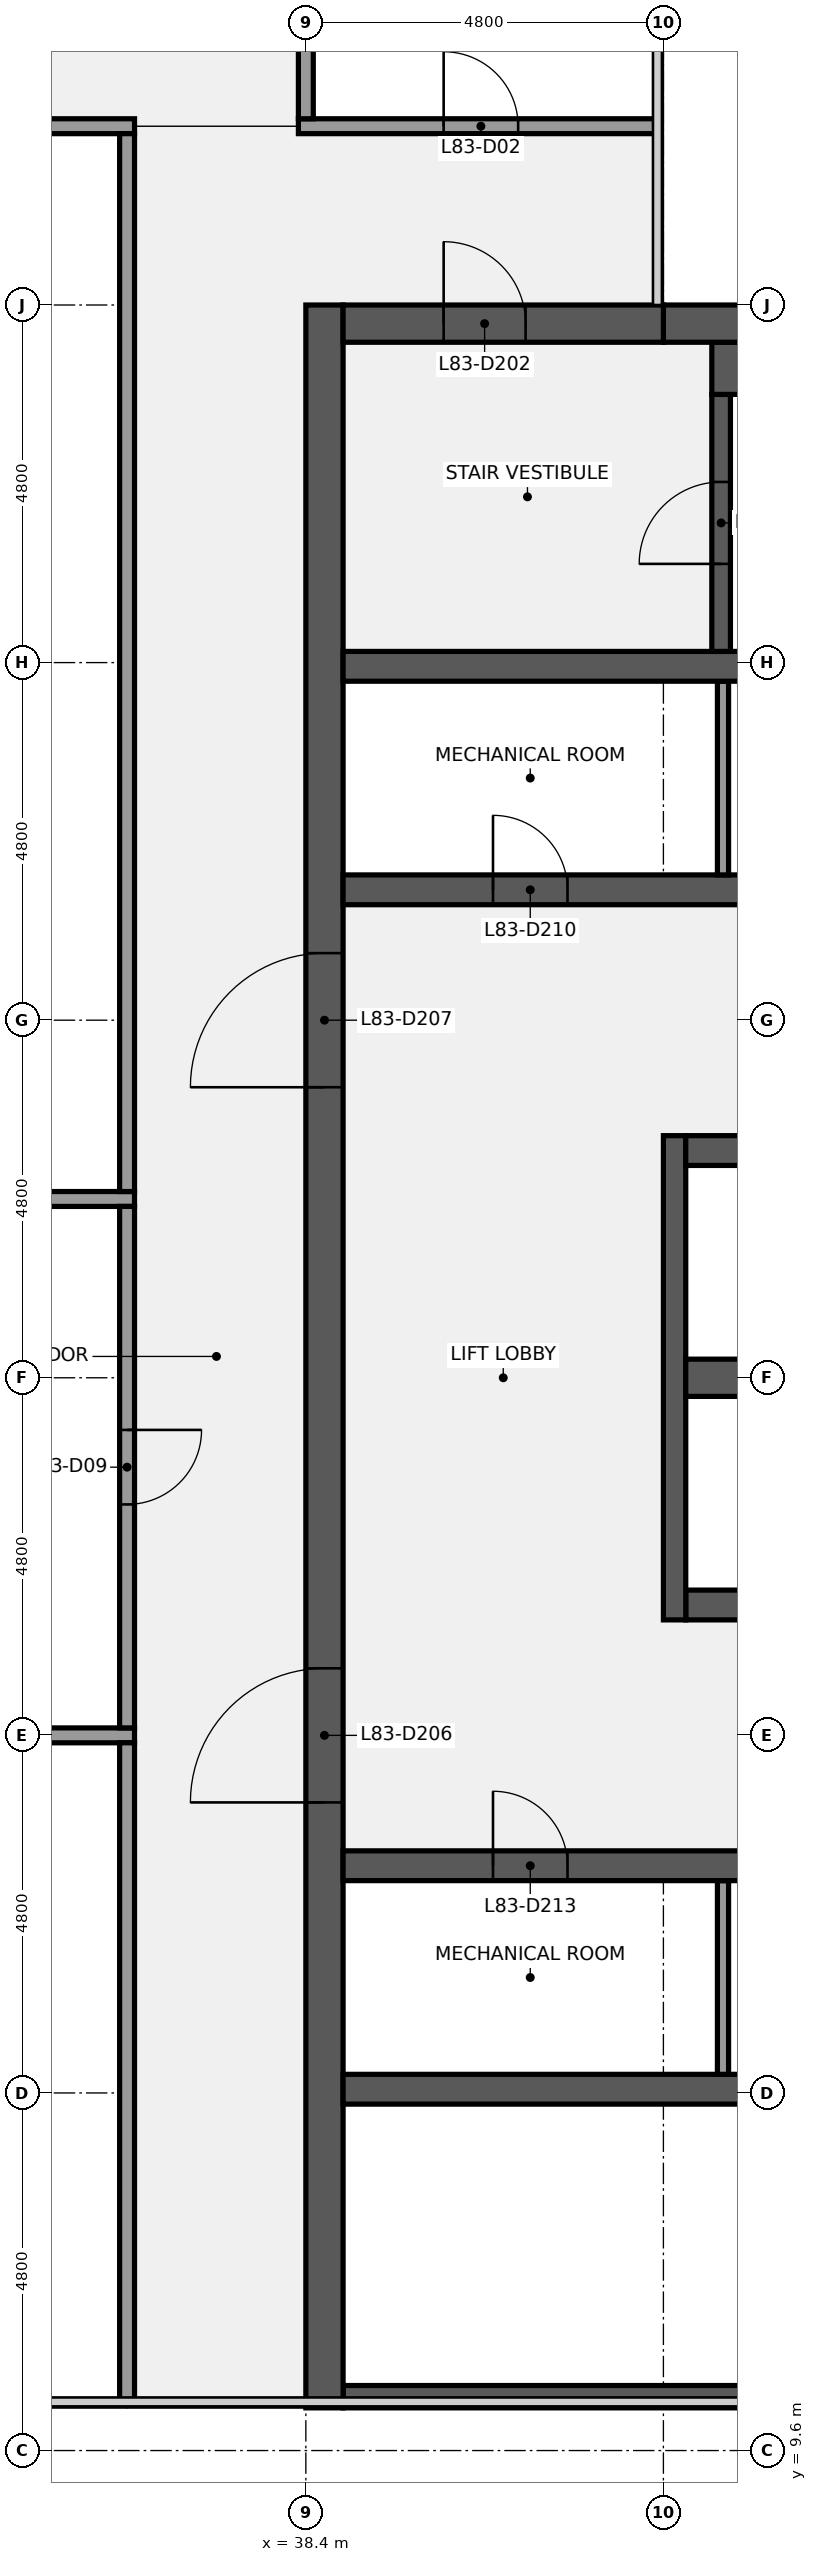
"""IFC4 building model, lengths in metres.
Left out: names, types, materials, properties, quantities, classifications, styles, units other than length and angle.
Written with IfcOpenShell. Run it as: python <this file> out.ifc"""

import sys

from ifc_helpers import new_model, si_unit, direction, frame, frame_2d, origin, place, context, subcontext, project, spatial, polyline, rectangle, outline, extrude, element, fill, save


model = new_model("IFC4")
c1 = context("Model", 3, precision=1e-05, world=origin(), true_north=direction((0.0, 1.0)))
c2 = subcontext(c1, "Body", "Model", "MODEL_VIEW")
j1 = project(units=[si_unit("LENGTHUNIT", "METRE"), si_unit("PLANEANGLEUNIT", "RADIAN")], contexts=[c1])
p1 = place(None, origin())
s1 = spatial("IfcSite", under=j1, at=p1, CompositionType="ELEMENT")
p2 = place(p1, origin())
s2 = spatial("IfcBuilding", under=s1, at=p2, CompositionType="ELEMENT")
p3 = place(p2, frame((0.0, 0.0, 370.3)))
s3 = spatial("IfcBuildingStorey", under=s2, at=p3, CompositionType="ELEMENT", Elevation=370.3)
p4 = place(p3, frame((57.1, 10.323, 0.0), z_axis=(0.0, 0.0, 1.0), x_axis=(-1.0, 0.0, 0.0)))
e1 = element("IfcWall", 1, at=p4, inside=s3, PredefinedType="SHEAR", context=c2, shape_type="SweptSolid", body=[
    extrude(outline(polyline([(0.0, 0.0), (18.2, 0.0), (18.2, 2.639), (0.0, 2.639), (0.0, 0.0)])), frame((0.0, 0.15, 0.0), z_axis=(0.0, -1.0, 0.0), x_axis=(1.0, 0.0, 0.0)), (0.0, 0.0, 1.0), 0.3),
])
p5 = place(p3, frame((38.65, 10.173, 0.0), z_axis=(0.0, 0.0, 1.0), x_axis=(0.0, 1.0, 0.0)))
e2 = element("IfcWall", 2, at=p5, inside=s3, PredefinedType="SHEAR", context=c2, shape_type="SweptSolid", body=[
    extrude(outline(polyline([(0.0, 0.0), (28.227, 0.0), (28.227, 3.75), (1.247, 3.75), (0.0, 2.488), (0.0, 0.0)])), frame((0.0, 0.25, 0.0), z_axis=(0.0, -1.0, 0.0), x_axis=(1.0, 0.0, 0.0)), (0.0, 0.0, 1.0), 0.5),
])
p6 = place(p5, frame((8.127, 0.0, 0.0)))
e3 = element("IfcOpeningElement", 3, at=p6, cuts=e2, PredefinedType="OPENING", context=c2, shape_type="SweptSolid", body=[
    extrude(rectangle(XDim=1.8, YDim=2.1, at=frame_2d((0.9, 1.05))), frame((0.0, 0.26, 0.0), z_axis=(0.0, -1.0, 0.0), x_axis=(1.0, 0.0, 0.0)), (0.0, 0.0, 1.0), 0.52),
])
p7 = place(p5, frame((17.727, 0.0, 0.0)))
e4 = element("IfcOpeningElement", 4, at=p7, cuts=e2, PredefinedType="OPENING", context=c2, shape_type="SweptSolid", body=[
    extrude(rectangle(XDim=1.8, YDim=2.1, at=frame_2d((0.9, 1.05))), frame((0.0, 0.26, 0.0), z_axis=(0.0, -1.0, 0.0), x_axis=(1.0, 0.0, 0.0)), (0.0, 0.0, 1.0), 0.52),
])
p8 = place(p3, frame((38.9, 14.45, 0.0), z_axis=(0.0, 0.0, 1.0), x_axis=(1.0, 0.0, 0.0)))
e5 = element("IfcWall", 5, at=p8, inside=s3, PredefinedType="SHEAR", context=c2, shape_type="SweptSolid", body=[
    extrude(rectangle(XDim=18.2, YDim=0.4, at=frame_2d((9.1, 0.0))), origin(), (0.0, 0.0, 1.0), 3.75),
])
p9 = place(p8, frame((12.7, 0.0, 0.0)))
e6 = element("IfcOpeningElement", 6, at=p9, cuts=e5, PredefinedType="OPENING", context=c2, shape_type="SweptSolid", body=[
    extrude(rectangle(XDim=1.0, YDim=2.1, at=frame_2d((0.5, 1.05))), frame((0.0, 0.21, 0.0), z_axis=(0.0, -1.0, 0.0), x_axis=(1.0, 0.0, 0.0)), (0.0, 0.0, 1.0), 0.42),
])
p10 = place(p3, frame((44.0, 14.65, 0.0), z_axis=(0.0, 0.0, 1.0), x_axis=(0.0, 1.0, 0.0)))
e7 = element("IfcWall", 7, at=p10, inside=s3, PredefinedType="PARTITIONING", context=c2, shape_type="SweptSolid", body=[
    extrude(rectangle(XDim=2.6, YDim=0.15, at=frame_2d((1.3, 0.0))), origin(), (0.0, 0.0, 1.0), 3.75),
])
p11 = place(p3, frame((38.9, 17.45, 0.0), z_axis=(0.0, 0.0, 1.0), x_axis=(1.0, 0.0, 0.0)))
e8 = element("IfcWall", 8, at=p11, inside=s3, PredefinedType="SHEAR", context=c2, shape_type="SweptSolid", body=[
    extrude(rectangle(XDim=18.2, YDim=0.4, at=frame_2d((9.1, 0.0))), origin(), (0.0, 0.0, 1.0), 3.75),
])
p12 = place(p11, frame((13.587, 0.0, 0.0)))
e9 = element("IfcOpeningElement", 9, at=p12, cuts=e8, PredefinedType="OPENING", context=c2, shape_type="SweptSolid", body=[
    extrude(rectangle(XDim=1.0, YDim=2.1, at=frame_2d((0.5, 1.05))), frame((0.0, 0.21, 0.0), z_axis=(0.0, -1.0, 0.0), x_axis=(1.0, 0.0, 0.0)), (0.0, 0.0, 1.0), 0.42),
])
p13 = place(p11, frame((7.0, 0.0, 0.0)))
e10 = element("IfcOpeningElement", 10, at=p13, cuts=e8, PredefinedType="OPENING", context=c2, shape_type="SweptSolid", body=[
    extrude(rectangle(XDim=1.0, YDim=2.1, at=frame_2d((0.5, 1.05))), frame((0.0, 0.21, 0.0), z_axis=(0.0, -1.0, 0.0), x_axis=(1.0, 0.0, 0.0)), (0.0, 0.0, 1.0), 0.42),
])
p14 = place(p11, frame((2.012, 0.0, 0.0)))
e11 = element("IfcOpeningElement", 11, at=p14, cuts=e8, PredefinedType="OPENING", context=c2, shape_type="SweptSolid", body=[
    extrude(rectangle(XDim=1.0, YDim=2.1, at=frame_2d((0.5, 1.05))), frame((0.0, 0.21, 0.0), z_axis=(0.0, -1.0, 0.0), x_axis=(1.0, 0.0, 0.0)), (0.0, 0.0, 1.0), 0.42),
])
p15 = place(p3, frame((43.5, 20.95, 0.0), z_axis=(0.0, 0.0, 1.0), x_axis=(1.0, 0.0, 0.0)))
e12 = element("IfcWall", 12, at=p15, inside=s3, PredefinedType="SHEAR", context=c2, shape_type="SweptSolid", body=[
    extrude(rectangle(XDim=13.6, YDim=0.4, at=frame_2d((6.8, 0.0))), origin(), (0.0, 0.0, 1.0), 3.75),
])
p16 = place(p15, frame((6.15, 0.0, 0.0)))
e13 = element("IfcOpeningElement", 13, at=p16, cuts=e12, PredefinedType="OPENING", context=c2, shape_type="SweptSolid", body=[
    extrude(rectangle(XDim=1.1, YDim=2.1, at=frame_2d((0.55, 1.05))), frame((0.0, 0.21, 0.0), z_axis=(0.0, -1.0, 0.0), x_axis=(1.0, 0.0, 0.0)), (0.0, 0.0, 1.0), 0.42),
])
p17 = place(p15, frame((1.3, 0.0, 0.0)))
e14 = element("IfcOpeningElement", 14, at=p17, cuts=e12, PredefinedType="OPENING", context=c2, shape_type="SweptSolid", body=[
    extrude(rectangle(XDim=1.0, YDim=2.1, at=frame_2d((0.5, 1.05))), frame((0.0, 0.21, 0.0), z_axis=(0.0, -1.0, 0.0), x_axis=(1.0, 0.0, 0.0)), (0.0, 0.0, 1.0), 0.42),
])
p18 = place(p3, frame((43.35, 20.75, 0.0), z_axis=(0.0, 0.0, 1.0), x_axis=(0.0, 1.0, 0.0)))
e15 = element("IfcWall", 15, at=p18, inside=s3, PredefinedType="SHEAR", context=c2, shape_type="SweptSolid", body=[
    extrude(rectangle(XDim=6.5, YDim=0.3, at=frame_2d((3.25, 0.0))), origin(), (0.0, 0.0, 1.0), 3.75),
])
p19 = place(p3, frame((43.5, 24.0, 0.0), z_axis=(0.0, 0.0, 1.0), x_axis=(1.0, 0.0, 0.0)))
e16 = element("IfcWall", 16, at=p19, inside=s3, PredefinedType="SHEAR", context=c2, shape_type="SweptSolid", body=[
    extrude(rectangle(XDim=13.6, YDim=0.5, at=frame_2d((6.8, 0.0))), origin(), (0.0, 0.0, 1.0), 3.75),
])
p20 = place(p3, frame((43.5, 27.05, 0.0), z_axis=(0.0, 0.0, 1.0), x_axis=(1.0, 0.0, 0.0)))
e17 = element("IfcWall", 17, at=p20, inside=s3, PredefinedType="SHEAR", context=c2, shape_type="SweptSolid", body=[
    extrude(rectangle(XDim=13.6, YDim=0.4, at=frame_2d((6.8, 0.0))), origin(), (0.0, 0.0, 1.0), 3.75),
])
p21 = place(p20, frame((8.7, 0.0, 0.0)))
e18 = element("IfcOpeningElement", 18, at=p21, cuts=e17, PredefinedType="OPENING", context=c2, shape_type="SweptSolid", body=[
    extrude(rectangle(XDim=1.0, YDim=2.1, at=frame_2d((0.5, 1.05))), frame((0.0, 0.21, 0.0), z_axis=(0.0, -1.0, 0.0), x_axis=(1.0, 0.0, 0.0)), (0.0, 0.0, 1.0), 0.42),
])
p22 = place(p20, frame((1.5, 0.0, 0.0)))
e19 = element("IfcOpeningElement", 19, at=p22, cuts=e17, PredefinedType="OPENING", context=c2, shape_type="SweptSolid", body=[
    extrude(rectangle(XDim=1.2, YDim=2.1, at=frame_2d((0.6, 1.05))), frame((0.0, 0.21, 0.0), z_axis=(0.0, -1.0, 0.0), x_axis=(1.0, 0.0, 0.0)), (0.0, 0.0, 1.0), 0.42),
])
p23 = place(p3, frame((38.9, 30.55, 0.0), z_axis=(0.0, 0.0, 1.0), x_axis=(1.0, 0.0, 0.0)))
e20 = element("IfcWall", 20, at=p23, inside=s3, PredefinedType="SHEAR", context=c2, shape_type="SweptSolid", body=[
    extrude(rectangle(XDim=18.2, YDim=0.4, at=frame_2d((9.1, 0.0))), origin(), (0.0, 0.0, 1.0), 3.75),
])
p24 = place(p23, frame((13.587, 0.0, 0.0)))
e21 = element("IfcOpeningElement", 21, at=p24, cuts=e20, PredefinedType="OPENING", context=c2, shape_type="SweptSolid", body=[
    extrude(rectangle(XDim=1.0, YDim=2.1, at=frame_2d((0.5, 1.05))), frame((0.0, 0.21, 0.0), z_axis=(0.0, -1.0, 0.0), x_axis=(1.0, 0.0, 0.0)), (0.0, 0.0, 1.0), 0.42),
])
p25 = place(p23, frame((7.0, 0.0, 0.0)))
e22 = element("IfcOpeningElement", 22, at=p25, cuts=e20, PredefinedType="OPENING", context=c2, shape_type="SweptSolid", body=[
    extrude(rectangle(XDim=1.0, YDim=2.1, at=frame_2d((0.5, 1.05))), frame((0.0, 0.21, 0.0), z_axis=(0.0, -1.0, 0.0), x_axis=(1.0, 0.0, 0.0)), (0.0, 0.0, 1.0), 0.42),
])
p26 = place(p23, frame((2.012, 0.0, 0.0)))
e23 = element("IfcOpeningElement", 23, at=p26, cuts=e20, PredefinedType="OPENING", context=c2, shape_type="SweptSolid", body=[
    extrude(rectangle(XDim=1.0, YDim=2.1, at=frame_2d((0.5, 1.05))), frame((0.0, 0.21, 0.0), z_axis=(0.0, -1.0, 0.0), x_axis=(1.0, 0.0, 0.0)), (0.0, 0.0, 1.0), 0.42),
])
p27 = place(p3, frame((44.0, 30.75, 0.0), z_axis=(0.0, 0.0, 1.0), x_axis=(0.0, 1.0, 0.0)))
e24 = element("IfcWall", 24, at=p27, inside=s3, PredefinedType="PARTITIONING", context=c2, shape_type="SweptSolid", body=[
    extrude(rectangle(XDim=2.6, YDim=0.15, at=frame_2d((1.3, 0.0))), origin(), (0.0, 0.0, 1.0), 3.75),
])
p28 = place(p3, frame((38.9, 33.55, 0.0), z_axis=(0.0, 0.0, 1.0), x_axis=(1.0, 0.0, 0.0)))
e25 = element("IfcWall", 25, at=p28, inside=s3, PredefinedType="SHEAR", context=c2, shape_type="SweptSolid", body=[
    extrude(rectangle(XDim=18.2, YDim=0.4, at=frame_2d((9.1, 0.0))), origin(), (0.0, 0.0, 1.0), 3.75),
])
p29 = place(p3, frame((43.975, 33.75, 0.0), z_axis=(0.0, 0.0, 1.0), x_axis=(0.0, 1.0, 0.0)))
e26 = element("IfcWall", 26, at=p29, inside=s3, PredefinedType="SHEAR", context=c2, shape_type="SweptSolid", body=[
    extrude(rectangle(XDim=3.45, YDim=0.25, at=frame_2d((1.725, 0.0))), origin(), (0.0, 0.0, 1.0), 3.75),
])
p30 = place(p29, frame((1.175, 0.0, 0.0)))
e27 = element("IfcOpeningElement", 27, at=p30, cuts=e26, PredefinedType="OPENING", context=c2, shape_type="SweptSolid", body=[
    extrude(rectangle(XDim=1.1, YDim=2.1, at=frame_2d((0.55, 1.05))), frame((0.0, 0.135, 0.0), z_axis=(0.0, -1.0, 0.0), x_axis=(1.0, 0.0, 0.0)), (0.0, 0.0, 1.0), 0.27),
])
p31 = place(p3, frame((43.85, 37.55, 0.0), z_axis=(0.0, 0.0, 1.0), x_axis=(1.0, 0.0, 0.0)))
e28 = element("IfcWall", 28, at=p31, inside=s3, PredefinedType="SHEAR", context=c2, shape_type="SweptSolid", body=[
    extrude(rectangle(XDim=7.5, YDim=0.7, at=frame_2d((3.75, 0.0))), origin(), (0.0, 0.0, 1.0), 3.75),
])
p32 = place(p3, frame((43.2, 38.15, 0.0), z_axis=(0.0, 0.0, 1.0), x_axis=(1.0, 0.0, 0.0)))
e29 = element("IfcWall", 29, at=p32, inside=s3, PredefinedType="SHEAR", context=c2, shape_type="SweptSolid", body=[
    extrude(rectangle(XDim=13.9, YDim=0.5, at=frame_2d((6.95, 0.0))), origin(), (0.0, 0.0, 1.0), 3.75),
])
p33 = place(p3, frame((38.9, 38.15, 0.0), z_axis=(0.0, 0.0, 1.0), x_axis=(1.0, 0.0, 0.0)))
e30 = element("IfcWall", 30, at=p33, inside=s3, PredefinedType="SHEAR", context=c2, shape_type="SweptSolid", body=[
    extrude(rectangle(XDim=4.3, YDim=0.5, at=frame_2d((2.15, 0.0))), origin(), (0.0, 0.0, 1.0), 3.75),
])
p34 = place(p33, frame((1.35, 0.0, 0.0)))
e31 = element("IfcOpeningElement", 31, at=p34, cuts=e30, PredefinedType="OPENING", context=c2, shape_type="SweptSolid", body=[
    extrude(rectangle(XDim=1.1, YDim=2.1, at=frame_2d((0.55, 1.05))), frame((0.0, 0.26, 0.0), z_axis=(0.0, -1.0, 0.0), x_axis=(1.0, 0.0, 0.0)), (0.0, 0.0, 1.0), 0.52),
])
for number, where, z_axis, x_axis in (
    (32, (21.5, 19.2, 0.0), (0.0, 0.0, 1.0), (1.0, 0.0, 0.0)),
    (33, (21.5, 26.4, 0.0), (0.0, 0.0, 1.0), (1.0, 0.0, 0.0)),
    (34, (21.5, 40.8, 0.0), (0.0, 0.0, 1.0), (1.0, 0.0, 0.0)),
):
    element("IfcWall", number, at=place(p3, frame(where, z_axis=z_axis, x_axis=x_axis)), inside=s3, PredefinedType="PARTITIONING", context=c2, shape_type="SweptSolid", body=[
        extrude(rectangle(XDim=14.6, YDim=0.2, at=frame_2d((7.3, 0.0))), origin(), (0.0, 0.0, 1.0), 2.759),
    ])
p35 = place(p3, frame((38.3, 40.8, 0.0), z_axis=(0.0, 0.0, 1.0), x_axis=(1.0, 0.0, 0.0)))
e35 = element("IfcWall", 35, at=p35, inside=s3, PredefinedType="PARTITIONING", context=c2, shape_type="SweptSolid", body=[
    extrude(rectangle(XDim=4.8, YDim=0.2, at=frame_2d((2.4, 0.0))), origin(), (0.0, 0.0, 1.0), 2.759),
])
p36 = place(p35, frame((1.95, 0.0, 0.0)))
e36 = element("IfcOpeningElement", 36, at=p36, cuts=e35, PredefinedType="OPENING", context=c2, shape_type="SweptSolid", body=[
    extrude(rectangle(XDim=1.0, YDim=2.1, at=frame_2d((0.5, 1.05))), frame((0.0, 0.11, 0.0), z_axis=(0.0, -1.0, 0.0), x_axis=(1.0, 0.0, 0.0)), (0.0, 0.0, 1.0), 0.22),
])
p37 = place(p3, frame((36.0, 10.273, 0.0), z_axis=(0.0, 0.0, 1.0), x_axis=(0.0, 1.0, 0.0)))
e37 = element("IfcWall", 37, at=p37, inside=s3, PredefinedType="PARTITIONING", context=c2, shape_type="SweptSolid", body=[
    extrude(rectangle(XDim=8.827, YDim=0.2, at=frame_2d((4.414, 0.0))), origin(), (0.0, 0.0, 1.0), 2.759),
])
p38 = place(p3, frame((36.0, 19.3, 0.0), z_axis=(0.0, 0.0, 1.0), x_axis=(0.0, 1.0, 0.0)))
e38 = element("IfcWall", 38, at=p38, inside=s3, PredefinedType="PARTITIONING", context=c2, shape_type="SweptSolid", body=[
    extrude(rectangle(XDim=7.0, YDim=0.2, at=frame_2d((3.5, 0.0))), origin(), (0.0, 0.0, 1.0), 2.759),
])
p39 = place(p38, frame((3.0, 0.0, 0.0)))
e39 = element("IfcOpeningElement", 39, at=p39, cuts=e38, PredefinedType="OPENING", context=c2, shape_type="SweptSolid", body=[
    extrude(rectangle(XDim=1.0, YDim=2.1, at=frame_2d((0.5, 1.05))), frame((0.0, 0.11, 0.0), z_axis=(0.0, -1.0, 0.0), x_axis=(1.0, 0.0, 0.0)), (0.0, 0.0, 1.0), 0.22),
])
p40 = place(p3, frame((36.0, 26.5, 0.0), z_axis=(0.0, 0.0, 1.0), x_axis=(0.0, 1.0, 0.0)))
e40 = element("IfcWall", 40, at=p40, inside=s3, PredefinedType="PARTITIONING", context=c2, shape_type="SweptSolid", body=[
    extrude(rectangle(XDim=14.2, YDim=0.2, at=frame_2d((7.1, 0.0))), origin(), (0.0, 0.0, 1.0), 2.759),
])
p41 = place(p3, frame((38.4, 40.9, 0.0), z_axis=(0.0, 0.0, 1.0), x_axis=(0.0, 1.0, 0.0)))
e41 = element("IfcWall", 41, at=p41, inside=s3, PredefinedType="PARTITIONING", context=c2, shape_type="SweptSolid", body=[
    extrude(rectangle(XDim=2.2, YDim=0.2, at=frame_2d((1.1, 0.0))), origin(), (0.0, 0.0, 1.0), 2.759),
])
p42 = place(p30, origin())
e42 = element("IfcDoor", 42, at=p42, inside=s3, OperationType="SINGLE_SWING_LEFT", PredefinedType="DOOR", context=c2, shape_type="SweptSolid", body=[
    extrude(rectangle(XDim=1.1, YDim=2.1, at=frame_2d((0.55, 1.05))), frame((0.0, 0.025, 0.0), z_axis=(0.0, -1.0, 0.0), x_axis=(1.0, 0.0, 0.0)), (0.0, 0.0, 1.0), 0.05),
])
fill(e27, e42)
p43 = place(p34, origin())
e43 = element("IfcDoor", 43, at=p43, inside=s3, OperationType="SINGLE_SWING_LEFT", PredefinedType="DOOR", context=c2, shape_type="SweptSolid", body=[
    extrude(rectangle(XDim=1.1, YDim=2.1, at=frame_2d((0.55, 1.05))), frame((0.0, 0.025, 0.0), z_axis=(0.0, -1.0, 0.0), x_axis=(1.0, 0.0, 0.0)), (0.0, 0.0, 1.0), 0.05),
])
fill(e31, e43)
p44 = place(p6, origin())
e44 = element("IfcDoor", 44, at=p44, inside=s3, OperationType="DOUBLE_DOOR_SINGLE_SWING", PredefinedType="DOOR", context=c2, shape_type="SweptSolid", body=[
    extrude(rectangle(XDim=1.8, YDim=2.1, at=frame_2d((0.9, 1.05))), frame((0.0, 0.025, 0.0), z_axis=(0.0, -1.0, 0.0), x_axis=(1.0, 0.0, 0.0)), (0.0, 0.0, 1.0), 0.05),
])
fill(e3, e44)
p45 = place(p7, origin())
e45 = element("IfcDoor", 45, at=p45, inside=s3, OperationType="DOUBLE_DOOR_SINGLE_SWING", PredefinedType="DOOR", context=c2, shape_type="SweptSolid", body=[
    extrude(rectangle(XDim=1.8, YDim=2.1, at=frame_2d((0.9, 1.05))), frame((0.0, 0.025, 0.0), z_axis=(0.0, -1.0, 0.0), x_axis=(1.0, 0.0, 0.0)), (0.0, 0.0, 1.0), 0.05),
])
fill(e4, e45)
p46 = place(p26, origin())
e46 = element("IfcDoor", 46, at=p46, inside=s3, OperationType="SINGLE_SWING_LEFT", PredefinedType="DOOR", context=c2, shape_type="SweptSolid", body=[
    extrude(rectangle(XDim=1.0, YDim=2.1, at=frame_2d((0.5, 1.05))), frame((0.0, 0.025, 0.0), z_axis=(0.0, -1.0, 0.0), x_axis=(1.0, 0.0, 0.0)), (0.0, 0.0, 1.0), 0.05),
])
fill(e23, e46)
p47 = place(p14, origin())
e47 = element("IfcDoor", 47, at=p47, inside=s3, OperationType="SINGLE_SWING_LEFT", PredefinedType="DOOR", context=c2, shape_type="SweptSolid", body=[
    extrude(rectangle(XDim=1.0, YDim=2.1, at=frame_2d((0.5, 1.05))), frame((0.0, 0.025, 0.0), z_axis=(0.0, -1.0, 0.0), x_axis=(1.0, 0.0, 0.0)), (0.0, 0.0, 1.0), 0.05),
])
fill(e11, e47)
p48 = place(p36, origin())
e48 = element("IfcDoor", 48, at=p48, inside=s3, OperationType="SINGLE_SWING_LEFT", PredefinedType="DOOR", context=c2, shape_type="SweptSolid", body=[
    extrude(rectangle(XDim=1.0, YDim=2.1, at=frame_2d((0.5, 1.05))), frame((0.0, 0.025, 0.0), z_axis=(0.0, -1.0, 0.0), x_axis=(1.0, 0.0, 0.0)), (0.0, 0.0, 1.0), 0.05),
])
fill(e36, e48)
p49 = place(p39, origin())
e49 = element("IfcDoor", 49, at=p49, inside=s3, OperationType="SINGLE_SWING_RIGHT", PredefinedType="DOOR", context=c2, shape_type="SweptSolid", body=[
    extrude(rectangle(XDim=1.0, YDim=2.1, at=frame_2d((0.5, 1.05))), frame((0.0, 0.025, 0.0), z_axis=(0.0, -1.0, 0.0), x_axis=(1.0, 0.0, 0.0)), (0.0, 0.0, 1.0), 0.05),
])
fill(e39, e49)
save(model, sys.argv[1])
